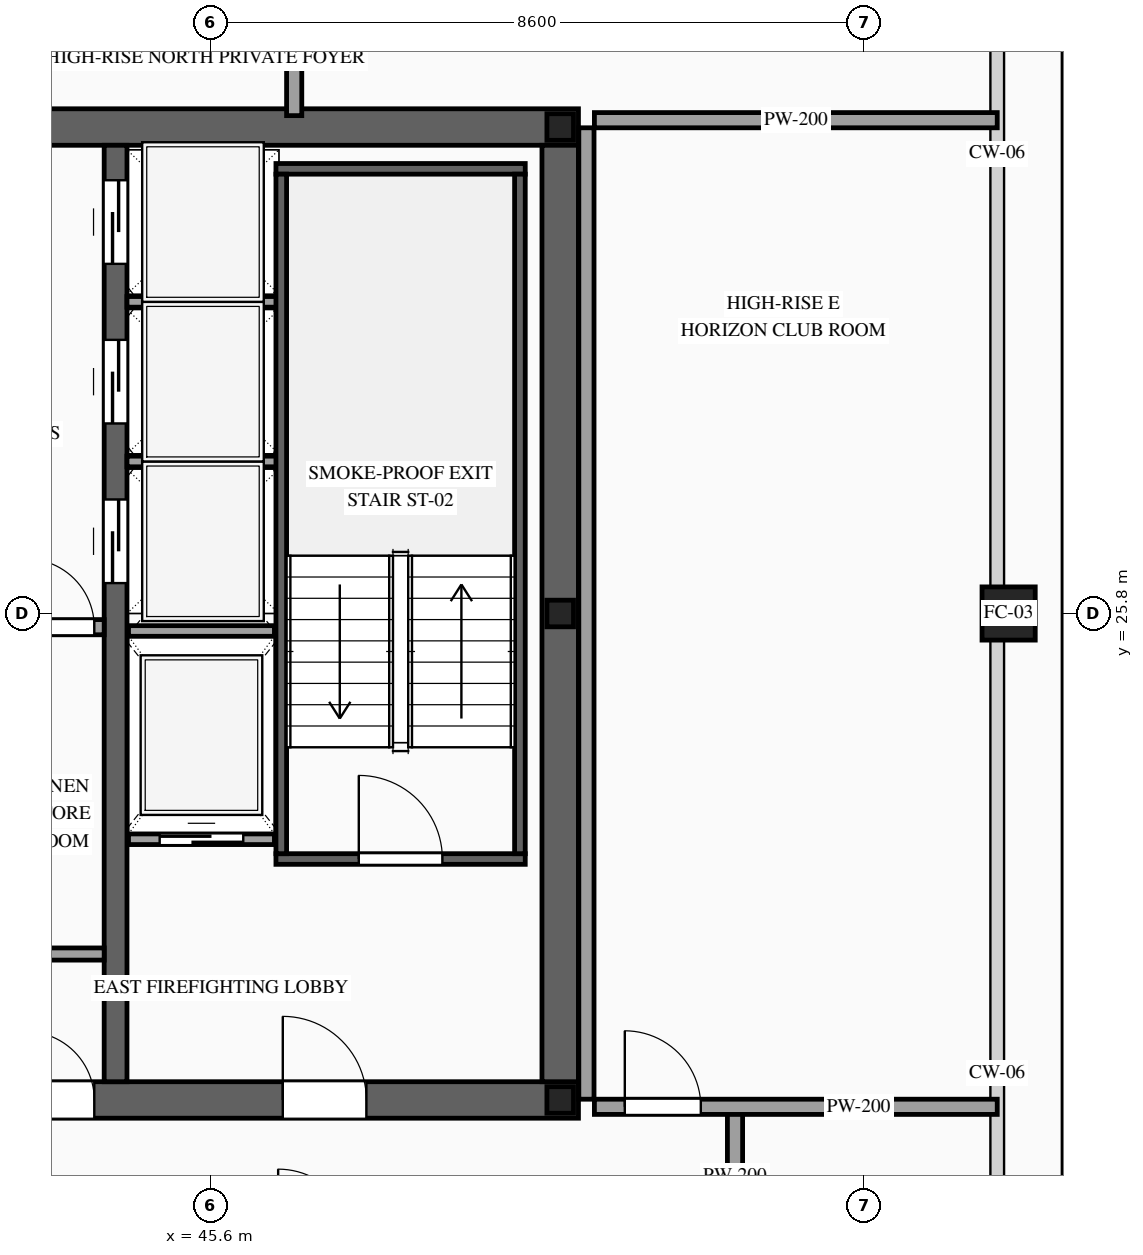
"""IFC4 building model, lengths in metres.
Left out: names, types, materials, properties, quantities, classifications, styles, units other than length and angle.
Written with IfcOpenShell. Run it as: python <this file> out.ifc"""

import sys

from ifc_helpers import new_model, si_unit, direction, frame, frame_2d, origin, origin_2d, place, context, subcontext, project, spatial, rectangle, hollow_rectangle, i_section, extrude, source, transform, mapped, element, fill, save


model = new_model("IFC4")
c1 = context("Model", 3, precision=1e-05, world=origin(), true_north=direction((0.0, 1.0)))
c2 = subcontext(c1, "Body", "Model", "MODEL_VIEW")
j1 = project(units=[si_unit("LENGTHUNIT", "METRE"), si_unit("PLANEANGLEUNIT", "RADIAN")], contexts=[c1])
p1 = place(None, origin())
s1 = spatial("IfcSite", under=j1, at=p1, CompositionType="ELEMENT")
p2 = place(p1, origin())
s2 = spatial("IfcBuilding", under=s1, at=p2, CompositionType="ELEMENT")
p3 = place(p2, frame((0.0, 0.0, 311.2)))
s3 = spatial("IfcBuildingStorey", under=s2, at=p3, CompositionType="ELEMENT", Elevation=311.2)
p4 = place(p3, frame((23.56, 19.4, 0.0), z_axis=(0.0, 0.0, 1.0), x_axis=(1.0, 0.0, 0.0)))
e1 = element("IfcWall", 1, at=p4, inside=s3, PredefinedType="SHEAR", context=c2, shape_type="SweptSolid", body=[
    extrude(rectangle(XDim=26.88, YDim=0.48, at=frame_2d((13.44, 0.0))), origin(), (0.0, 0.0, 1.0), 3.5),
])
p5 = place(p4, frame((1.89, 0.0, 0.0)))
e2 = element("IfcOpeningElement", 2, at=p5, cuts=e1, PredefinedType="OPENING", context=c2, shape_type="SweptSolid", body=[
    extrude(rectangle(XDim=1.1, YDim=2.2, at=frame_2d((0.55, 1.1))), frame((0.0, 0.255, 0.0), z_axis=(0.0, -1.0, 0.0), x_axis=(1.0, 0.0, 0.0)), (0.0, 0.0, 1.0), 0.51),
])
p6 = place(p4, frame((9.79, 0.0, 0.0)))
e3 = element("IfcOpeningElement", 3, at=p6, cuts=e1, PredefinedType="OPENING", context=c2, shape_type="SweptSolid", body=[
    extrude(rectangle(XDim=1.1, YDim=2.2, at=frame_2d((0.55, 1.1))), frame((0.0, 0.255, 0.0), z_axis=(0.0, -1.0, 0.0), x_axis=(1.0, 0.0, 0.0)), (0.0, 0.0, 1.0), 0.51),
])
p7 = place(p4, frame((22.99, 0.0, 0.0)))
e4 = element("IfcOpeningElement", 4, at=p7, cuts=e1, PredefinedType="OPENING", context=c2, shape_type="SweptSolid", body=[
    extrude(rectangle(XDim=1.1, YDim=2.2, at=frame_2d((0.55, 1.1))), frame((0.0, 0.255, 0.0), z_axis=(0.0, -1.0, 0.0), x_axis=(1.0, 0.0, 0.0)), (0.0, 0.0, 1.0), 0.51),
])
p8 = place(p4, frame((19.61, 0.0, 0.0)))
e5 = element("IfcOpeningElement", 5, at=p8, cuts=e1, PredefinedType="OPENING", context=c2, shape_type="SweptSolid", body=[
    extrude(rectangle(XDim=0.9, YDim=2.15, at=frame_2d((0.45, 1.075))), frame((0.0, 0.255, 0.0), z_axis=(0.0, -1.0, 0.0), x_axis=(1.0, 0.0, 0.0)), (0.0, 0.0, 1.0), 0.51),
])
p9 = place(p4, frame((18.17, 0.0, 0.0)))
e6 = element("IfcOpeningElement", 6, at=p9, cuts=e1, PredefinedType="OPENING", context=c2, shape_type="SweptSolid", body=[
    extrude(rectangle(XDim=0.9, YDim=2.15, at=frame_2d((0.45, 1.075))), frame((0.0, 0.255, 0.0), z_axis=(0.0, -1.0, 0.0), x_axis=(1.0, 0.0, 0.0)), (0.0, 0.0, 1.0), 0.51),
])
p10 = place(p3, frame((23.56, 32.2, 0.0), z_axis=(0.0, 0.0, 1.0), x_axis=(1.0, 0.0, 0.0)))
e7 = element("IfcWall", 7, at=p10, inside=s3, PredefinedType="SHEAR", context=c2, shape_type="SweptSolid", body=[
    extrude(rectangle(XDim=26.88, YDim=0.48, at=frame_2d((13.44, 0.0))), origin(), (0.0, 0.0, 1.0), 3.5),
])
p11 = place(p10, frame((4.51, 0.0, 0.0)))
e8 = element("IfcOpeningElement", 8, at=p11, cuts=e7, PredefinedType="OPENING", context=c2, shape_type="SweptSolid", body=[
    extrude(rectangle(XDim=0.9, YDim=2.15, at=frame_2d((0.45, 1.075))), frame((0.0, 0.255, 0.0), z_axis=(0.0, -1.0, 0.0), x_axis=(1.0, 0.0, 0.0)), (0.0, 0.0, 1.0), 0.51),
])
p12 = place(p10, frame((9.79, 0.0, 0.0)))
e9 = element("IfcOpeningElement", 9, at=p12, cuts=e7, PredefinedType="OPENING", context=c2, shape_type="SweptSolid", body=[
    extrude(rectangle(XDim=1.1, YDim=2.2, at=frame_2d((0.55, 1.1))), frame((0.0, 0.255, 0.0), z_axis=(0.0, -1.0, 0.0), x_axis=(1.0, 0.0, 0.0)), (0.0, 0.0, 1.0), 0.51),
])
p13 = place(p10, frame((15.64, 0.0, 0.0)))
e10 = element("IfcOpeningElement", 10, at=p13, cuts=e7, PredefinedType="OPENING", context=c2, shape_type="SweptSolid", body=[
    extrude(rectangle(XDim=1.1, YDim=2.2, at=frame_2d((0.55, 1.1))), frame((0.0, 0.255, 0.0), z_axis=(0.0, -1.0, 0.0), x_axis=(1.0, 0.0, 0.0)), (0.0, 0.0, 1.0), 0.51),
])
p14 = place(p10, frame((18.74, 0.0, 0.0)))
e11 = element("IfcOpeningElement", 11, at=p14, cuts=e7, PredefinedType="OPENING", context=c2, shape_type="SweptSolid", body=[
    extrude(rectangle(XDim=1.1, YDim=2.2, at=frame_2d((0.55, 1.1))), frame((0.0, 0.255, 0.0), z_axis=(0.0, -1.0, 0.0), x_axis=(1.0, 0.0, 0.0)), (0.0, 0.0, 1.0), 0.51),
])
m1 = source(origin(), c2, "Body", "SweptSolid", [
    extrude(rectangle(XDim=12.32, YDim=0.48, at=frame_2d((6.16, 0.0))), origin(), (0.0, 0.0, 1.0), 3.5),
])
p15 = place(p3, frame((50.2, 19.64, 0.0), z_axis=(0.0, 0.0, 1.0), x_axis=(0.0, 1.0, 0.0)))
e12 = element("IfcWall", 12, at=p15, inside=s3, PredefinedType="SHEAR", context=c2, shape_type="MappedRepresentation", body=[
    mapped(m1, transform((0.0, 0.0, 0.0), scale=1.0)),
])
p16 = place(p3, frame((44.35, 19.64, 0.0), z_axis=(0.0, 0.0, 1.0), x_axis=(0.0, 1.0, 0.0)))
e13 = element("IfcWall", 13, at=p16, inside=s3, PredefinedType="SOLIDWALL", context=c2, shape_type="SweptSolid", body=[
    extrude(rectangle(XDim=12.32, YDim=0.3, at=frame_2d((6.16, 0.0))), origin(), (0.0, 0.0, 1.0), 3.5),
])
p17 = place(p16, frame((6.56, 0.0, 0.0)))
e14 = element("IfcOpeningElement", 14, at=p17, cuts=e13, PredefinedType="OPENING", context=c2, shape_type="SweptSolid", body=[
    extrude(rectangle(XDim=1.1, YDim=2.2, at=frame_2d((0.55, 1.1))), frame((0.0, 0.165, 0.0), z_axis=(0.0, -1.0, 0.0), x_axis=(1.0, 0.0, 0.0)), (0.0, 0.0, 1.0), 0.33),
])
p18 = place(p16, frame((8.66, 0.0, 0.0)))
e15 = element("IfcOpeningElement", 15, at=p18, cuts=e13, PredefinedType="OPENING", context=c2, shape_type="SweptSolid", body=[
    extrude(rectangle(XDim=1.1, YDim=2.2, at=frame_2d((0.55, 1.1))), frame((0.0, 0.165, 0.0), z_axis=(0.0, -1.0, 0.0), x_axis=(1.0, 0.0, 0.0)), (0.0, 0.0, 1.0), 0.33),
])
p19 = place(p16, frame((10.76, 0.0, 0.0)))
e16 = element("IfcOpeningElement", 16, at=p19, cuts=e13, PredefinedType="OPENING", context=c2, shape_type="SweptSolid", body=[
    extrude(rectangle(XDim=1.1, YDim=2.2, at=frame_2d((0.55, 1.1))), frame((0.0, 0.165, 0.0), z_axis=(0.0, -1.0, 0.0), x_axis=(1.0, 0.0, 0.0)), (0.0, 0.0, 1.0), 0.33),
])
m2 = source(origin(), c2, "Body", "SweptSolid", [
    extrude(i_section(OverallWidth=0.35, OverallDepth=0.35, WebThickness=0.012, FlangeThickness=0.019, at=origin_2d()), origin(), (0.0, 0.0, 1.0), 3.5),
])
for number, where, z_axis, x_axis in (
    (17, (50.2, 19.4, 0.0), (0.0, 0.0, 1.0), (1.0, 0.0, 0.0)),
    (18, (50.2, 25.8, 0.0), (0.0, 0.0, 1.0), (1.0, 0.0, 0.0)),
    (19, (50.2, 32.2, 0.0), (0.0, 0.0, 1.0), (1.0, 0.0, 0.0)),
):
    element("IfcColumn", number, at=place(p3, frame(where, z_axis=z_axis, x_axis=x_axis)), inside=s3, PredefinedType="COLUMN", context=c2, shape_type="MappedRepresentation", body=[
        mapped(m2, transform((0.0, 0.0, 0.0), scale=1.0)),
    ])
m3 = source(origin(), c2, "Body", "SweptSolid", [
    extrude(hollow_rectangle(XDim=0.7, YDim=0.7, WallThickness=0.032, at=origin_2d()), origin(), (0.0, 0.0, 1.0), 3.5),
])
p20 = place(p3, frame((56.1, 25.8, 0.0), z_axis=(0.0, 0.0, 1.0), x_axis=(1.0, 0.0, 0.0)))
e20 = element("IfcColumn", 20, at=p20, inside=s3, PredefinedType="COLUMN", context=c2, shape_type="MappedRepresentation", body=[
    mapped(m3, transform((0.0, 0.0, 0.0), scale=1.0)),
])
p21 = place(p3, frame((44.52, 22.83, 0.0), z_axis=(0.0, 0.0, 1.0), x_axis=(1.0, 0.0, 0.0)))
e21 = element("IfcWall", 21, at=p21, inside=s3, PredefinedType="SOLIDWALL", context=c2, shape_type="SweptSolid", body=[
    extrude(rectangle(XDim=1.92, YDim=0.14, at=frame_2d((0.96, 0.0))), origin(), (0.0, 0.0, 1.0), 3.28),
])
p22 = place(p21, frame((0.41, 0.0, 0.0)))
e22 = element("IfcOpeningElement", 22, at=p22, cuts=e21, PredefinedType="OPENING", context=c2, shape_type="SweptSolid", body=[
    extrude(rectangle(XDim=1.1, YDim=2.2, at=frame_2d((0.55, 1.1))), frame((0.0, 0.085, 0.0), z_axis=(0.0, -1.0, 0.0), x_axis=(1.0, 0.0, 0.0)), (0.0, 0.0, 1.0), 0.17),
])
m4 = source(origin(), c2, "Body", "SweptSolid", [
    extrude(rectangle(XDim=1.92, YDim=0.14, at=frame_2d((0.96, 0.0))), origin(), (0.0, 0.0, 1.0), 3.28),
])
p23 = place(p3, frame((44.52, 25.57, 0.0), z_axis=(0.0, 0.0, 1.0), x_axis=(1.0, 0.0, 0.0)))
e23 = element("IfcWall", 23, at=p23, inside=s3, PredefinedType="SOLIDWALL", context=c2, shape_type="MappedRepresentation", body=[
    mapped(m4, transform((0.0, 0.0, 0.0), scale=1.0)),
])
m5 = source(origin(), c2, "Body", "SweptSolid", [
    extrude(rectangle(XDim=2.0, YDim=0.14, at=frame_2d((1.0, 0.0))), origin(), (0.0, 0.0, 1.0), 3.28),
])
for number, where, z_axis, x_axis in (
    (24, (44.5, 27.8, 0.0), (0.0, 0.0, 1.0), (1.0, 0.0, 0.0)),
    (25, (44.5, 29.9, 0.0), (0.0, 0.0, 1.0), (1.0, 0.0, 0.0)),
):
    element("IfcWall", number, at=place(p3, frame(where, z_axis=z_axis, x_axis=x_axis)), inside=s3, PredefinedType="SOLIDWALL", context=c2, shape_type="MappedRepresentation", body=[
        mapped(m5, transform((0.0, 0.0, 0.0), scale=1.0)),
    ])
p24 = place(p3, frame((46.46, 22.57, 0.0), z_axis=(0.0, 0.0, 1.0), x_axis=(1.0, 0.0, 0.0)))
e26 = element("IfcWall", 26, at=p24, inside=s3, PredefinedType="SOLIDWALL", context=c2, shape_type="SweptSolid", body=[
    extrude(rectangle(XDim=3.28, YDim=0.14, at=frame_2d((1.64, 0.0))), origin(), (0.0, 0.0, 1.0), 3.28),
])
p25 = place(p24, frame((1.09, 0.0, 0.0)))
e27 = element("IfcOpeningElement", 27, at=p25, cuts=e26, PredefinedType="OPENING", context=c2, shape_type="SweptSolid", body=[
    extrude(rectangle(XDim=1.1, YDim=2.2, at=frame_2d((0.55, 1.1))), frame((0.0, 0.085, 0.0), z_axis=(0.0, -1.0, 0.0), x_axis=(1.0, 0.0, 0.0)), (0.0, 0.0, 1.0), 0.17),
])
m6 = source(origin(), c2, "Body", "SweptSolid", [
    extrude(rectangle(XDim=3.28, YDim=0.14, at=frame_2d((1.64, 0.0))), origin(), (0.0, 0.0, 1.0), 3.28),
])
p26 = place(p3, frame((46.46, 31.65, 0.0), z_axis=(0.0, 0.0, 1.0), x_axis=(1.0, 0.0, 0.0)))
e28 = element("IfcWall", 28, at=p26, inside=s3, PredefinedType="SOLIDWALL", context=c2, shape_type="MappedRepresentation", body=[
    mapped(m6, transform((0.0, 0.0, 0.0), scale=1.0)),
])
m7 = source(origin(), c2, "Body", "SweptSolid", [
    extrude(rectangle(XDim=8.94, YDim=0.14, at=frame_2d((4.47, 0.0))), origin(), (0.0, 0.0, 1.0), 3.28),
])
for number, where, z_axis, x_axis in (
    (29, (46.53, 22.64, 0.0), (0.0, 0.0, 1.0), (0.0, 1.0, 0.0)),
    (30, (49.67, 22.64, 0.0), (0.0, 0.0, 1.0), (0.0, 1.0, 0.0)),
):
    element("IfcWall", number, at=place(p3, frame(where, z_axis=z_axis, x_axis=x_axis)), inside=s3, PredefinedType="SOLIDWALL", context=c2, shape_type="MappedRepresentation", body=[
        mapped(m7, transform((0.0, 0.0, 0.0), scale=1.0)),
    ])
m8 = source(origin(), c2, "Body", "SweptSolid", [
    extrude(rectangle(XDim=1.17, YDim=0.16, at=frame_2d((0.585, 0.0))), origin(), (0.0, 0.0, 1.0), 3.28),
])
p27 = place(p3, frame((43.03, 21.32, 0.0), z_axis=(0.0, 0.0, 1.0), x_axis=(1.0, 0.0, 0.0)))
e31 = element("IfcWall", 31, at=p27, inside=s3, PredefinedType="PARTITIONING", context=c2, shape_type="MappedRepresentation", body=[
    mapped(m8, transform((0.0, 0.0, 0.0), scale=1.0)),
])
p28 = place(p3, frame((43.05, 25.62, 0.0), z_axis=(0.0, 0.0, 1.0), x_axis=(1.0, 0.0, 0.0)))
e32 = element("IfcWall", 32, at=p28, inside=s3, PredefinedType="PARTITIONING", context=c2, shape_type="SweptSolid", body=[
    extrude(rectangle(XDim=1.15, YDim=0.2, at=frame_2d((0.575, 0.0))), origin(), (0.0, 0.0, 1.0), 3.28),
])
p29 = place(p28, frame((0.12, 0.0, 0.0)))
e33 = element("IfcOpeningElement", 33, at=p29, cuts=e32, PredefinedType="OPENING", context=c2, shape_type="SweptSolid", body=[
    extrude(rectangle(XDim=0.9, YDim=2.15, at=frame_2d((0.45, 1.075))), frame((0.0, 0.115, 0.0), z_axis=(0.0, -1.0, 0.0), x_axis=(1.0, 0.0, 0.0)), (0.0, 0.0, 1.0), 0.23),
])
m9 = source(origin(), c2, "Body", "SweptSolid", [
    extrude(rectangle(XDim=1.7, YDim=0.2, at=frame_2d((0.85, 0.0))), origin(), (0.0, 0.0, 1.0), 3.28),
])
for number, where, z_axis, x_axis in (
    (34, (46.7, 32.35, 0.0), (0.0, 0.0, 1.0), (0.0, 1.0, 0.0)),
    (35, (52.5, 17.55, 0.0), (0.0, 0.0, 1.0), (0.0, 1.0, 0.0)),
):
    element("IfcWall", number, at=place(p3, frame(where, z_axis=z_axis, x_axis=x_axis)), inside=s3, PredefinedType="PARTITIONING", context=c2, shape_type="MappedRepresentation", body=[
        mapped(m9, transform((0.0, 0.0, 0.0), scale=1.0)),
    ])
p30 = place(p3, frame((50.65, 19.31, 0.0), z_axis=(0.0, 0.0, 1.0), x_axis=(1.0, 0.0, 0.0)))
e36 = element("IfcWall", 36, at=p30, inside=s3, PredefinedType="PARTITIONING", context=c2, shape_type="SweptSolid", body=[
    extrude(rectangle(XDim=5.3, YDim=0.2, at=frame_2d((2.65, 0.0))), origin(), (0.0, 0.0, 1.0), 2.825),
])
p31 = place(p30, frame((0.4, 0.0, 0.0)))
e37 = element("IfcOpeningElement", 37, at=p31, cuts=e36, PredefinedType="OPENING", context=c2, shape_type="SweptSolid", body=[
    extrude(rectangle(XDim=1.0, YDim=2.2, at=frame_2d((0.5, 1.1))), frame((0.0, 0.115, 0.0), z_axis=(0.0, -1.0, 0.0), x_axis=(1.0, 0.0, 0.0)), (0.0, 0.0, 1.0), 0.23),
])
m10 = source(origin(), c2, "Body", "SweptSolid", [
    extrude(rectangle(XDim=5.3, YDim=0.2, at=frame_2d((2.65, 0.0))), origin(), (0.0, 0.0, 1.0), 2.825),
])
p32 = place(p3, frame((50.65, 32.29, 0.0), z_axis=(0.0, 0.0, 1.0), x_axis=(1.0, 0.0, 0.0)))
e38 = element("IfcWall", 38, at=p32, inside=s3, PredefinedType="PARTITIONING", context=c2, shape_type="MappedRepresentation", body=[
    mapped(m10, transform((0.0, 0.0, 0.0), scale=1.0)),
])
m11 = source(origin(), c2, "Body", "SweptSolid", [
    extrude(rectangle(XDim=12.78, YDim=0.2, at=frame_2d((6.39, 0.0))), origin(), (0.0, 0.0, 1.0), 3.28),
])
p33 = place(p3, frame((50.545, 19.41, 0.0), z_axis=(0.0, 0.0, 1.0), x_axis=(0.0, 1.0, 0.0)))
e39 = element("IfcWall", 39, at=p33, inside=s3, PredefinedType="PARTITIONING", context=c2, shape_type="MappedRepresentation", body=[
    mapped(m11, transform((0.0, 0.0, 0.0), scale=1.0)),
])
m12 = source(origin(), c2, "Body", "SweptSolid", [
    extrude(rectangle(XDim=1.1, YDim=2.2, at=frame_2d((0.55, 1.1))), frame((0.0, 0.025, 0.0), z_axis=(0.0, -1.0, 0.0), x_axis=(1.0, 0.0, 0.0)), (0.0, 0.0, 1.0), 0.05),
])
p34 = place(p22, origin())
e40 = element("IfcDoor", 40, at=p34, inside=s3, OperationType="SLIDING_TO_RIGHT", PredefinedType="DOOR", context=c2, shape_type="MappedRepresentation", body=[
    mapped(m12, transform((0.0, 0.0, 0.0), scale=1.0)),
])
fill(e22, e40)
p35 = place(p17, origin())
e41 = element("IfcDoor", 41, at=p35, inside=s3, OperationType="SLIDING_TO_LEFT", PredefinedType="DOOR", context=c2, shape_type="MappedRepresentation", body=[
    mapped(m12, transform((0.0, 0.0, 0.0), scale=1.0)),
])
fill(e14, e41)
p36 = place(p18, origin())
e42 = element("IfcDoor", 42, at=p36, inside=s3, OperationType="SLIDING_TO_RIGHT", PredefinedType="DOOR", context=c2, shape_type="MappedRepresentation", body=[
    mapped(m12, transform((0.0, 0.0, 0.0), scale=1.0)),
])
fill(e15, e42)
p37 = place(p19, origin())
e43 = element("IfcDoor", 43, at=p37, inside=s3, OperationType="SLIDING_TO_LEFT", PredefinedType="DOOR", context=c2, shape_type="MappedRepresentation", body=[
    mapped(m12, transform((0.0, 0.0, 0.0), scale=1.0)),
])
fill(e16, e43)
m13 = source(origin(), c2, "Body", "SweptSolid", [
    extrude(rectangle(XDim=1.1, YDim=2.2, at=frame_2d((0.55, 1.1))), frame((0.0, 0.025, 0.0), z_axis=(0.0, -1.0, 0.0), x_axis=(1.0, 0.0, 0.0)), (0.0, 0.0, 1.0), 0.05),
])
p38 = place(p25, origin())
e44 = element("IfcDoor", 44, at=p38, inside=s3, OperationType="SINGLE_SWING_LEFT", PredefinedType="DOOR", context=c2, shape_type="MappedRepresentation", body=[
    mapped(m13, transform((0.0, 0.0, 0.0), scale=1.0)),
])
fill(e27, e44)
p39 = place(p7, origin())
e45 = element("IfcDoor", 45, at=p39, inside=s3, OperationType="SINGLE_SWING_LEFT", PredefinedType="DOOR", context=c2, shape_type="MappedRepresentation", body=[
    mapped(m13, transform((0.0, 0.0, 0.0), scale=1.0)),
])
fill(e4, e45)
m14 = source(origin(), c2, "Body", "SweptSolid", [
    extrude(rectangle(XDim=0.9, YDim=2.15, at=frame_2d((0.45, 1.075))), frame((0.0, 0.025, 0.0), z_axis=(0.0, -1.0, 0.0), x_axis=(1.0, 0.0, 0.0)), (0.0, 0.0, 1.0), 0.05),
])
p40 = place(p8, origin())
e46 = element("IfcDoor", 46, at=p40, inside=s3, OperationType="SINGLE_SWING_LEFT", PredefinedType="DOOR", context=c2, shape_type="MappedRepresentation", body=[
    mapped(m14, transform((0.0, 0.0, 0.0), scale=1.0)),
])
fill(e5, e46)
p41 = place(p29, origin())
e47 = element("IfcDoor", 47, at=p41, inside=s3, OperationType="SINGLE_SWING_LEFT", PredefinedType="DOOR", context=c2, shape_type="MappedRepresentation", body=[
    mapped(m14, transform((0.0, 0.0, 0.0), scale=1.0)),
])
fill(e33, e47)
m15 = source(origin(), c2, "Body", "SweptSolid", [
    extrude(rectangle(XDim=1.0, YDim=2.2, at=frame_2d((0.5, 1.1))), frame((0.0, 0.025, 0.0), z_axis=(0.0, -1.0, 0.0), x_axis=(1.0, 0.0, 0.0)), (0.0, 0.0, 1.0), 0.05),
])
p42 = place(p31, origin())
e48 = element("IfcDoor", 48, at=p42, inside=s3, OperationType="SINGLE_SWING_LEFT", PredefinedType="DOOR", context=c2, shape_type="MappedRepresentation", body=[
    mapped(m15, transform((0.0, 0.0, 0.0), scale=1.0)),
])
fill(e37, e48)
save(model, sys.argv[1])
